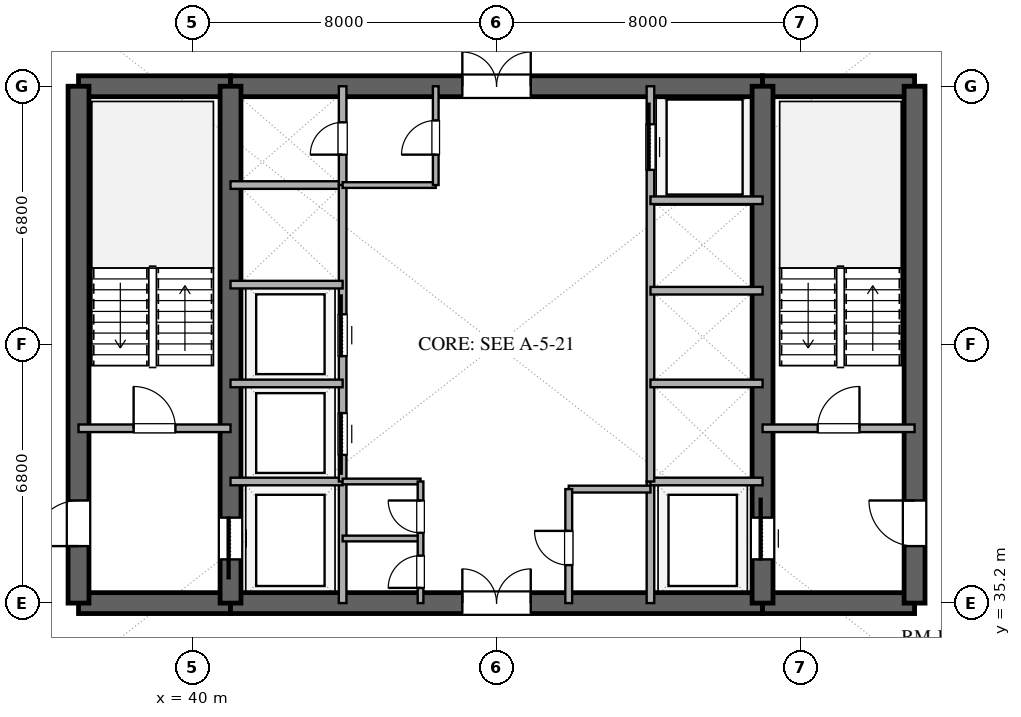
"""IFC4 building model, lengths in metres.
Left out: names, types, materials, properties, quantities, classifications, styles, units other than length and angle.
Written with IfcOpenShell. Run it as: python <this file> out.ifc"""

import sys

from ifc_helpers import new_model, si_unit, direction, frame, frame_2d, origin, place, context, subcontext, project, spatial, rectangle, extrude, element, fill, save


model = new_model("IFC4")
c1 = context("Model", 3, precision=1e-05, world=origin(), true_north=direction((0.0, 1.0)))
c2 = subcontext(c1, "Body", "Model", "MODEL_VIEW")
j1 = project(units=[si_unit("LENGTHUNIT", "METRE"), si_unit("PLANEANGLEUNIT", "RADIAN")], contexts=[c1])
p1 = place(None, origin())
s1 = spatial("IfcSite", under=j1, at=p1, CompositionType="ELEMENT")
p2 = place(p1, origin())
s2 = spatial("IfcBuilding", under=s1, at=p2, CompositionType="ELEMENT")
p3 = place(p2, frame((0.0, 0.0, 130.8)))
s3 = spatial("IfcBuildingStorey", under=s2, at=p3, CompositionType="ELEMENT", Elevation=130.8)
p4 = place(p3, frame((37.0, 35.2, 0.0), z_axis=(0.0, 0.0, 1.0), x_axis=(1.0, 0.0, 0.0)))
e1 = element("IfcWall", 1, at=p4, inside=s3, PredefinedType="SHEAR", context=c2, shape_type="SweptSolid", body=[
    extrude(rectangle(XDim=4.0, YDim=0.55, at=frame_2d((2.0, 0.0))), origin(), (0.0, 0.0, 1.0), 3.32),
])
p5 = place(p3, frame((41.0, 35.2, 0.0), z_axis=(0.0, 0.0, 1.0), x_axis=(1.0, 0.0, 0.0)))
e2 = element("IfcWall", 2, at=p5, inside=s3, PredefinedType="SHEAR", context=c2, shape_type="SweptSolid", body=[
    extrude(rectangle(XDim=14.0, YDim=0.55, at=frame_2d((7.0, 0.0))), origin(), (0.0, 0.0, 1.0), 3.32),
])
p6 = place(p5, frame((6.1, 0.0, 0.0)))
e3 = element("IfcOpeningElement", 3, at=p6, cuts=e2, PredefinedType="OPENING", context=c2, shape_type="SweptSolid", body=[
    extrude(rectangle(XDim=1.8, YDim=2.25, at=frame_2d((0.9, 1.125))), frame((0.0, 0.285, 0.0), z_axis=(0.0, -1.0, 0.0), x_axis=(1.0, 0.0, 0.0)), (0.0, 0.0, 1.0), 0.57),
])
for number, where, z_axis, x_axis in (
    (4, (55.0, 35.2, 0.0), (0.0, 0.0, 1.0), (1.0, 0.0, 0.0)),
    (5, (37.0, 48.8, 0.0), (0.0, 0.0, 1.0), (1.0, 0.0, 0.0)),
):
    element("IfcWall", number, at=place(p3, frame(where, z_axis=z_axis, x_axis=x_axis)), inside=s3, PredefinedType="SHEAR", context=c2, shape_type="SweptSolid", body=[
        extrude(rectangle(XDim=4.0, YDim=0.55, at=frame_2d((2.0, 0.0))), origin(), (0.0, 0.0, 1.0), 3.32),
    ])
p7 = place(p3, frame((41.0, 48.8, 0.0), z_axis=(0.0, 0.0, 1.0), x_axis=(1.0, 0.0, 0.0)))
e6 = element("IfcWall", 6, at=p7, inside=s3, PredefinedType="SHEAR", context=c2, shape_type="SweptSolid", body=[
    extrude(rectangle(XDim=14.0, YDim=0.55, at=frame_2d((7.0, 0.0))), origin(), (0.0, 0.0, 1.0), 3.32),
])
p8 = place(p7, frame((6.1, 0.0, 0.0)))
e7 = element("IfcOpeningElement", 7, at=p8, cuts=e6, PredefinedType="OPENING", context=c2, shape_type="SweptSolid", body=[
    extrude(rectangle(XDim=1.8, YDim=2.25, at=frame_2d((0.9, 1.125))), frame((0.0, 0.285, 0.0), z_axis=(0.0, -1.0, 0.0), x_axis=(1.0, 0.0, 0.0)), (0.0, 0.0, 1.0), 0.57),
])
p9 = place(p3, frame((55.0, 48.8, 0.0), z_axis=(0.0, 0.0, 1.0), x_axis=(1.0, 0.0, 0.0)))
e8 = element("IfcWall", 8, at=p9, inside=s3, PredefinedType="SHEAR", context=c2, shape_type="SweptSolid", body=[
    extrude(rectangle(XDim=4.0, YDim=0.55, at=frame_2d((2.0, 0.0))), origin(), (0.0, 0.0, 1.0), 3.32),
])
p10 = place(p3, frame((37.0, 35.2, 0.0), z_axis=(0.0, 0.0, 1.0), x_axis=(0.0, 1.0, 0.0)))
e9 = element("IfcWall", 9, at=p10, inside=s3, PredefinedType="SHEAR", context=c2, shape_type="SweptSolid", body=[
    extrude(rectangle(XDim=13.6, YDim=0.55, at=frame_2d((6.8, 0.0))), origin(), (0.0, 0.0, 1.0), 3.32),
])
p11 = place(p10, frame((1.5, 0.0, 0.0)))
e10 = element("IfcOpeningElement", 10, at=p11, cuts=e9, PredefinedType="OPENING", context=c2, shape_type="SweptSolid", body=[
    extrude(rectangle(XDim=1.2, YDim=2.15, at=frame_2d((0.6, 1.075))), frame((0.0, 0.285, 0.0), z_axis=(0.0, -1.0, 0.0), x_axis=(1.0, 0.0, 0.0)), (0.0, 0.0, 1.0), 0.57),
])
p12 = place(p3, frame((59.0, 35.2, 0.0), z_axis=(0.0, 0.0, 1.0), x_axis=(0.0, 1.0, 0.0)))
e11 = element("IfcWall", 11, at=p12, inside=s3, PredefinedType="SHEAR", context=c2, shape_type="SweptSolid", body=[
    extrude(rectangle(XDim=13.6, YDim=0.55, at=frame_2d((6.8, 0.0))), origin(), (0.0, 0.0, 1.0), 3.32),
])
p13 = place(p12, frame((1.5, 0.0, 0.0)))
e12 = element("IfcOpeningElement", 12, at=p13, cuts=e11, PredefinedType="OPENING", context=c2, shape_type="SweptSolid", body=[
    extrude(rectangle(XDim=1.2, YDim=2.15, at=frame_2d((0.6, 1.075))), frame((0.0, 0.285, 0.0), z_axis=(0.0, -1.0, 0.0), x_axis=(1.0, 0.0, 0.0)), (0.0, 0.0, 1.0), 0.57),
])
p14 = place(p3, frame((41.0, 35.2, 0.0), z_axis=(0.0, 0.0, 1.0), x_axis=(0.0, 1.0, 0.0)))
e13 = element("IfcWall", 13, at=p14, inside=s3, PredefinedType="SHEAR", context=c2, shape_type="SweptSolid", body=[
    extrude(rectangle(XDim=13.6, YDim=0.55, at=frame_2d((6.8, 0.0))), origin(), (0.0, 0.0, 1.0), 3.32),
])
p15 = place(p14, frame((1.15, 0.0, 0.0)))
e14 = element("IfcOpeningElement", 14, at=p15, cuts=e13, PredefinedType="OPENING", context=c2, shape_type="SweptSolid", body=[
    extrude(rectangle(XDim=1.1, YDim=2.2, at=frame_2d((0.55, 1.1))), frame((0.0, 0.285, 0.0), z_axis=(0.0, -1.0, 0.0), x_axis=(1.0, 0.0, 0.0)), (0.0, 0.0, 1.0), 0.57),
])
p16 = place(p3, frame((55.0, 35.2, 0.0), z_axis=(0.0, 0.0, 1.0), x_axis=(0.0, 1.0, 0.0)))
e15 = element("IfcWall", 15, at=p16, inside=s3, PredefinedType="SHEAR", context=c2, shape_type="SweptSolid", body=[
    extrude(rectangle(XDim=13.6, YDim=0.55, at=frame_2d((6.8, 0.0))), origin(), (0.0, 0.0, 1.0), 3.32),
])
p17 = place(p16, frame((1.15, 0.0, 0.0)))
e16 = element("IfcOpeningElement", 16, at=p17, cuts=e15, PredefinedType="OPENING", context=c2, shape_type="SweptSolid", body=[
    extrude(rectangle(XDim=1.1, YDim=2.2, at=frame_2d((0.55, 1.1))), frame((0.0, 0.285, 0.0), z_axis=(0.0, -1.0, 0.0), x_axis=(1.0, 0.0, 0.0)), (0.0, 0.0, 1.0), 0.57),
])
p18 = place(p3, frame((37.0, 39.8, 0.0), z_axis=(0.0, 0.0, 1.0), x_axis=(1.0, 0.0, 0.0)))
e17 = element("IfcWall", 17, at=p18, inside=s3, PredefinedType="SOLIDWALL", context=c2, shape_type="SweptSolid", body=[
    extrude(rectangle(XDim=4.0, YDim=0.2, at=frame_2d((2.0, 0.0))), origin(), (0.0, 0.0, 1.0), 2.68),
])
p19 = place(p18, frame((1.45, 0.0, 0.0)))
e18 = element("IfcOpeningElement", 18, at=p19, cuts=e17, PredefinedType="OPENING", context=c2, shape_type="SweptSolid", body=[
    extrude(rectangle(XDim=1.1, YDim=2.15, at=frame_2d((0.55, 1.075))), frame((0.0, 0.11, 0.0), z_axis=(0.0, -1.0, 0.0), x_axis=(1.0, 0.0, 0.0)), (0.0, 0.0, 1.0), 0.22),
])
p20 = place(p3, frame((55.0, 39.8, 0.0), z_axis=(0.0, 0.0, 1.0), x_axis=(1.0, 0.0, 0.0)))
e19 = element("IfcWall", 19, at=p20, inside=s3, PredefinedType="SOLIDWALL", context=c2, shape_type="SweptSolid", body=[
    extrude(rectangle(XDim=4.0, YDim=0.2, at=frame_2d((2.0, 0.0))), origin(), (0.0, 0.0, 1.0), 2.68),
])
p21 = place(p20, frame((1.45, 0.0, 0.0)))
e20 = element("IfcOpeningElement", 20, at=p21, cuts=e19, PredefinedType="OPENING", context=c2, shape_type="SweptSolid", body=[
    extrude(rectangle(XDim=1.1, YDim=2.15, at=frame_2d((0.55, 1.075))), frame((0.0, 0.11, 0.0), z_axis=(0.0, -1.0, 0.0), x_axis=(1.0, 0.0, 0.0)), (0.0, 0.0, 1.0), 0.22),
])
p22 = place(p3, frame((43.95, 35.2, 0.0), z_axis=(0.0, 0.0, 1.0), x_axis=(0.0, 1.0, 0.0)))
e21 = element("IfcWall", 21, at=p22, inside=s3, PredefinedType="SOLIDWALL", context=c2, shape_type="SweptSolid", body=[
    extrude(rectangle(XDim=3.2, YDim=0.2, at=frame_2d((1.6, 0.0))), origin(), (0.0, 0.0, 1.0), 2.68),
])
p23 = place(p3, frame((41.0, 38.4, 0.0), z_axis=(0.0, 0.0, 1.0), x_axis=(1.0, 0.0, 0.0)))
e22 = element("IfcWall", 22, at=p23, inside=s3, PredefinedType="SOLIDWALL", context=c2, shape_type="SweptSolid", body=[
    extrude(rectangle(XDim=2.95, YDim=0.2, at=frame_2d((1.475, 0.0))), origin(), (0.0, 0.0, 1.0), 2.68),
])
p24 = place(p3, frame((52.05, 35.2, 0.0), z_axis=(0.0, 0.0, 1.0), x_axis=(0.0, 1.0, 0.0)))
e23 = element("IfcWall", 23, at=p24, inside=s3, PredefinedType="SOLIDWALL", context=c2, shape_type="SweptSolid", body=[
    extrude(rectangle(XDim=3.2, YDim=0.2, at=frame_2d((1.6, 0.0))), origin(), (0.0, 0.0, 1.0), 2.68),
])
for number, where, z_axis, x_axis in (
    (24, (52.05, 38.4, 0.0), (0.0, 0.0, 1.0), (1.0, 0.0, 0.0)),
    (25, (41.0, 46.2, 0.0), (0.0, 0.0, 1.0), (1.0, 0.0, 0.0)),
):
    element("IfcWall", number, at=place(p3, frame(where, z_axis=z_axis, x_axis=x_axis)), inside=s3, PredefinedType="SOLIDWALL", context=c2, shape_type="SweptSolid", body=[
        extrude(rectangle(XDim=2.95, YDim=0.2, at=frame_2d((1.475, 0.0))), origin(), (0.0, 0.0, 1.0), 2.68),
    ])
p25 = place(p3, frame((43.95, 46.2, 0.0), z_axis=(0.0, 0.0, 1.0), x_axis=(0.0, 1.0, 0.0)))
e26 = element("IfcWall", 26, at=p25, inside=s3, PredefinedType="SOLIDWALL", context=c2, shape_type="SweptSolid", body=[
    extrude(rectangle(XDim=2.6, YDim=0.2, at=frame_2d((1.3, 0.0))), origin(), (0.0, 0.0, 1.0), 2.68),
])
p26 = place(p25, frame((0.8, 0.0, 0.0)))
e27 = element("IfcOpeningElement", 27, at=p26, cuts=e26, PredefinedType="OPENING", context=c2, shape_type="SweptSolid", body=[
    extrude(rectangle(XDim=0.85, YDim=2.15, at=frame_2d((0.425, 1.075))), frame((0.0, 0.11, 0.0), z_axis=(0.0, -1.0, 0.0), x_axis=(1.0, 0.0, 0.0)), (0.0, 0.0, 1.0), 0.22),
])
p27 = place(p3, frame((43.95, 38.4, 0.0), z_axis=(0.0, 0.0, 1.0), x_axis=(0.0, 1.0, 0.0)))
e28 = element("IfcWall", 28, at=p27, inside=s3, PredefinedType="SOLIDWALL", context=c2, shape_type="SweptSolid", body=[
    extrude(rectangle(XDim=7.8, YDim=0.2, at=frame_2d((3.9, 0.0))), origin(), (0.0, 0.0, 1.0), 2.68),
])
p28 = place(p27, frame((0.7, 0.0, 0.0)))
e29 = element("IfcOpeningElement", 29, at=p28, cuts=e28, PredefinedType="OPENING", context=c2, shape_type="SweptSolid", body=[
    extrude(rectangle(XDim=1.1, YDim=2.2, at=frame_2d((0.55, 1.1))), frame((0.0, 0.11, 0.0), z_axis=(0.0, -1.0, 0.0), x_axis=(1.0, 0.0, 0.0)), (0.0, 0.0, 1.0), 0.22),
])
p29 = place(p27, frame((3.3, 0.0, 0.0)))
e30 = element("IfcOpeningElement", 30, at=p29, cuts=e28, PredefinedType="OPENING", context=c2, shape_type="SweptSolid", body=[
    extrude(rectangle(XDim=1.1, YDim=2.2, at=frame_2d((0.55, 1.1))), frame((0.0, 0.11, 0.0), z_axis=(0.0, -1.0, 0.0), x_axis=(1.0, 0.0, 0.0)), (0.0, 0.0, 1.0), 0.22),
])
for number, where, z_axis, x_axis in (
    (31, (41.0, 40.98, 0.0), (0.0, 0.0, 1.0), (1.0, 0.0, 0.0)),
    (32, (41.0, 43.58, 0.0), (0.0, 0.0, 1.0), (1.0, 0.0, 0.0)),
):
    element("IfcWall", number, at=place(p3, frame(where, z_axis=z_axis, x_axis=x_axis)), inside=s3, PredefinedType="SOLIDWALL", context=c2, shape_type="SweptSolid", body=[
        extrude(rectangle(XDim=2.95, YDim=0.2, at=frame_2d((1.475, 0.0))), origin(), (0.0, 0.0, 1.0), 2.68),
    ])
p30 = place(p3, frame((52.05, 38.4, 0.0), z_axis=(0.0, 0.0, 1.0), x_axis=(0.0, 1.0, 0.0)))
e33 = element("IfcWall", 33, at=p30, inside=s3, PredefinedType="SOLIDWALL", context=c2, shape_type="SweptSolid", body=[
    extrude(rectangle(XDim=10.4, YDim=0.2, at=frame_2d((5.2, 0.0))), origin(), (0.0, 0.0, 1.0), 2.68),
])
p31 = place(p30, frame((8.2, 0.0, 0.0)))
e34 = element("IfcOpeningElement", 34, at=p31, cuts=e33, PredefinedType="OPENING", context=c2, shape_type="SweptSolid", body=[
    extrude(rectangle(XDim=1.2, YDim=2.2, at=frame_2d((0.6, 1.1))), frame((0.0, 0.11, 0.0), z_axis=(0.0, -1.0, 0.0), x_axis=(1.0, 0.0, 0.0)), (0.0, 0.0, 1.0), 0.22),
])
for number, where, z_axis, x_axis in (
    (35, (52.05, 40.98, 0.0), (0.0, 0.0, 1.0), (1.0, 0.0, 0.0)),
    (36, (52.05, 43.42, 0.0), (0.0, 0.0, 1.0), (1.0, 0.0, 0.0)),
    (37, (52.05, 45.8, 0.0), (0.0, 0.0, 1.0), (1.0, 0.0, 0.0)),
):
    element("IfcWall", number, at=place(p3, frame(where, z_axis=z_axis, x_axis=x_axis)), inside=s3, PredefinedType="SOLIDWALL", context=c2, shape_type="SweptSolid", body=[
        extrude(rectangle(XDim=2.95, YDim=0.2, at=frame_2d((1.475, 0.0))), origin(), (0.0, 0.0, 1.0), 2.68),
    ])
for number, where, z_axis, x_axis in (
    (38, (43.95, 36.9, 0.0), (0.0, 0.0, 1.0), (1.0, 0.0, 0.0)),
    (39, (43.95, 38.4, 0.0), (0.0, 0.0, 1.0), (1.0, 0.0, 0.0)),
):
    element("IfcWall", number, at=place(p3, frame(where, z_axis=z_axis, x_axis=x_axis)), inside=s3, PredefinedType="PARTITIONING", context=c2, shape_type="SweptSolid", body=[
        extrude(rectangle(XDim=2.05, YDim=0.15, at=frame_2d((1.025, 0.0))), origin(), (0.0, 0.0, 1.0), 2.68),
    ])
p32 = place(p3, frame((46.0, 35.2, 0.0), z_axis=(0.0, 0.0, 1.0), x_axis=(0.0, 1.0, 0.0)))
e40 = element("IfcWall", 40, at=p32, inside=s3, PredefinedType="PARTITIONING", context=c2, shape_type="SweptSolid", body=[
    extrude(rectangle(XDim=3.2, YDim=0.15, at=frame_2d((1.6, 0.0))), origin(), (0.0, 0.0, 1.0), 2.68),
])
p33 = place(p32, frame((0.4, 0.0, 0.0)))
e41 = element("IfcOpeningElement", 41, at=p33, cuts=e40, PredefinedType="OPENING", context=c2, shape_type="SweptSolid", body=[
    extrude(rectangle(XDim=0.85, YDim=2.15, at=frame_2d((0.425, 1.075))), frame((0.0, 0.085, 0.0), z_axis=(0.0, -1.0, 0.0), x_axis=(1.0, 0.0, 0.0)), (0.0, 0.0, 1.0), 0.17),
])
p34 = place(p32, frame((1.85, 0.0, 0.0)))
e42 = element("IfcOpeningElement", 42, at=p34, cuts=e40, PredefinedType="OPENING", context=c2, shape_type="SweptSolid", body=[
    extrude(rectangle(XDim=0.85, YDim=2.15, at=frame_2d((0.425, 1.075))), frame((0.0, 0.085, 0.0), z_axis=(0.0, -1.0, 0.0), x_axis=(1.0, 0.0, 0.0)), (0.0, 0.0, 1.0), 0.17),
])
p35 = place(p3, frame((43.95, 46.2, 0.0), z_axis=(0.0, 0.0, 1.0), x_axis=(1.0, 0.0, 0.0)))
e43 = element("IfcWall", 43, at=p35, inside=s3, PredefinedType="PARTITIONING", context=c2, shape_type="SweptSolid", body=[
    extrude(rectangle(XDim=2.45, YDim=0.15, at=frame_2d((1.225, 0.0))), origin(), (0.0, 0.0, 1.0), 2.68),
])
p36 = place(p3, frame((46.4, 46.2, 0.0), z_axis=(0.0, 0.0, 1.0), x_axis=(0.0, 1.0, 0.0)))
e44 = element("IfcWall", 44, at=p36, inside=s3, PredefinedType="PARTITIONING", context=c2, shape_type="SweptSolid", body=[
    extrude(rectangle(XDim=2.6, YDim=0.15, at=frame_2d((1.3, 0.0))), origin(), (0.0, 0.0, 1.0), 2.68),
])
p37 = place(p36, frame((0.8, 0.0, 0.0)))
e45 = element("IfcOpeningElement", 45, at=p37, cuts=e44, PredefinedType="OPENING", context=c2, shape_type="SweptSolid", body=[
    extrude(rectangle(XDim=0.9, YDim=2.15, at=frame_2d((0.45, 1.075))), frame((0.0, 0.085, 0.0), z_axis=(0.0, -1.0, 0.0), x_axis=(1.0, 0.0, 0.0)), (0.0, 0.0, 1.0), 0.17),
])
p38 = place(p3, frame((49.9, 38.2, 0.0), z_axis=(0.0, 0.0, 1.0), x_axis=(1.0, 0.0, 0.0)))
e46 = element("IfcWall", 46, at=p38, inside=s3, PredefinedType="PLUMBINGWALL", context=c2, shape_type="SweptSolid", body=[
    extrude(rectangle(XDim=2.15, YDim=0.18, at=frame_2d((1.075, 0.0))), origin(), (0.0, 0.0, 1.0), 2.68),
])
p39 = place(p3, frame((49.9, 35.2, 0.0), z_axis=(0.0, 0.0, 1.0), x_axis=(0.0, 1.0, 0.0)))
e47 = element("IfcWall", 47, at=p39, inside=s3, PredefinedType="PLUMBINGWALL", context=c2, shape_type="SweptSolid", body=[
    extrude(rectangle(XDim=3.0, YDim=0.18, at=frame_2d((1.5, 0.0))), origin(), (0.0, 0.0, 1.0), 2.68),
])
p40 = place(p39, frame((1.0, 0.0, 0.0)))
e48 = element("IfcOpeningElement", 48, at=p40, cuts=e47, PredefinedType="OPENING", context=c2, shape_type="SweptSolid", body=[
    extrude(rectangle(XDim=0.9, YDim=2.1, at=frame_2d((0.45, 1.05))), frame((0.0, 0.1, 0.0), z_axis=(0.0, -1.0, 0.0), x_axis=(1.0, 0.0, 0.0)), (0.0, 0.0, 1.0), 0.2),
])
p41 = place(p15, origin())
e49 = element("IfcDoor", 49, at=p41, inside=s3, OperationType="SLIDING_TO_LEFT", PredefinedType="DOOR", context=c2, shape_type="SweptSolid", body=[
    extrude(rectangle(XDim=1.1, YDim=2.2, at=frame_2d((0.55, 1.1))), frame((0.0, 0.025, 0.0), z_axis=(0.0, -1.0, 0.0), x_axis=(1.0, 0.0, 0.0)), (0.0, 0.0, 1.0), 0.05),
])
fill(e14, e49)
p42 = place(p17, origin())
e50 = element("IfcDoor", 50, at=p42, inside=s3, OperationType="SLIDING_TO_RIGHT", PredefinedType="DOOR", context=c2, shape_type="SweptSolid", body=[
    extrude(rectangle(XDim=1.1, YDim=2.2, at=frame_2d((0.55, 1.1))), frame((0.0, 0.025, 0.0), z_axis=(0.0, -1.0, 0.0), x_axis=(1.0, 0.0, 0.0)), (0.0, 0.0, 1.0), 0.05),
])
fill(e16, e50)
p43 = place(p11, origin())
e51 = element("IfcDoor", 51, at=p43, inside=s3, OperationType="SINGLE_SWING_LEFT", PredefinedType="DOOR", context=c2, shape_type="SweptSolid", body=[
    extrude(rectangle(XDim=1.2, YDim=2.15, at=frame_2d((0.6, 1.075))), frame((0.0, 0.025, 0.0), z_axis=(0.0, -1.0, 0.0), x_axis=(1.0, 0.0, 0.0)), (0.0, 0.0, 1.0), 0.05),
])
fill(e10, e51)
p44 = place(p13, origin())
e52 = element("IfcDoor", 52, at=p44, inside=s3, OperationType="SINGLE_SWING_RIGHT", PredefinedType="DOOR", context=c2, shape_type="SweptSolid", body=[
    extrude(rectangle(XDim=1.2, YDim=2.15, at=frame_2d((0.6, 1.075))), frame((0.0, 0.025, 0.0), z_axis=(0.0, -1.0, 0.0), x_axis=(1.0, 0.0, 0.0)), (0.0, 0.0, 1.0), 0.05),
])
fill(e12, e52)
p45 = place(p6, origin())
e53 = element("IfcDoor", 53, at=p45, inside=s3, OperationType="DOUBLE_DOOR_SINGLE_SWING", PredefinedType="DOOR", context=c2, shape_type="SweptSolid", body=[
    extrude(rectangle(XDim=1.8, YDim=2.25, at=frame_2d((0.9, 1.125))), frame((0.0, 0.025, 0.0), z_axis=(0.0, -1.0, 0.0), x_axis=(1.0, 0.0, 0.0)), (0.0, 0.0, 1.0), 0.05),
])
fill(e3, e53)
p46 = place(p8, origin())
e54 = element("IfcDoor", 54, at=p46, inside=s3, OperationType="DOUBLE_DOOR_SINGLE_SWING", PredefinedType="DOOR", context=c2, shape_type="SweptSolid", body=[
    extrude(rectangle(XDim=1.8, YDim=2.25, at=frame_2d((0.9, 1.125))), frame((0.0, 0.025, 0.0), z_axis=(0.0, -1.0, 0.0), x_axis=(1.0, 0.0, 0.0)), (0.0, 0.0, 1.0), 0.05),
])
fill(e7, e54)
p47 = place(p19, origin())
e55 = element("IfcDoor", 55, at=p47, inside=s3, OperationType="SINGLE_SWING_LEFT", PredefinedType="DOOR", context=c2, shape_type="SweptSolid", body=[
    extrude(rectangle(XDim=1.1, YDim=2.15, at=frame_2d((0.55, 1.075))), frame((0.0, 0.025, 0.0), z_axis=(0.0, -1.0, 0.0), x_axis=(1.0, 0.0, 0.0)), (0.0, 0.0, 1.0), 0.05),
])
fill(e18, e55)
p48 = place(p21, origin())
e56 = element("IfcDoor", 56, at=p48, inside=s3, OperationType="SINGLE_SWING_RIGHT", PredefinedType="DOOR", context=c2, shape_type="SweptSolid", body=[
    extrude(rectangle(XDim=1.1, YDim=2.15, at=frame_2d((0.55, 1.075))), frame((0.0, 0.025, 0.0), z_axis=(0.0, -1.0, 0.0), x_axis=(1.0, 0.0, 0.0)), (0.0, 0.0, 1.0), 0.05),
])
fill(e20, e56)
p49 = place(p26, origin())
e57 = element("IfcDoor", 57, at=p49, inside=s3, OperationType="SINGLE_SWING_LEFT", PredefinedType="DOOR", context=c2, shape_type="SweptSolid", body=[
    extrude(rectangle(XDim=0.85, YDim=2.15, at=frame_2d((0.425, 1.075))), frame((0.0, 0.025, 0.0), z_axis=(0.0, -1.0, 0.0), x_axis=(1.0, 0.0, 0.0)), (0.0, 0.0, 1.0), 0.05),
])
fill(e27, e57)
p50 = place(p28, origin())
e58 = element("IfcDoor", 58, at=p50, inside=s3, OperationType="SLIDING_TO_LEFT", PredefinedType="DOOR", context=c2, shape_type="SweptSolid", body=[
    extrude(rectangle(XDim=1.1, YDim=2.2, at=frame_2d((0.55, 1.1))), frame((0.0, 0.025, 0.0), z_axis=(0.0, -1.0, 0.0), x_axis=(1.0, 0.0, 0.0)), (0.0, 0.0, 1.0), 0.05),
])
fill(e29, e58)
p51 = place(p29, origin())
e59 = element("IfcDoor", 59, at=p51, inside=s3, OperationType="SLIDING_TO_RIGHT", PredefinedType="DOOR", context=c2, shape_type="SweptSolid", body=[
    extrude(rectangle(XDim=1.1, YDim=2.2, at=frame_2d((0.55, 1.1))), frame((0.0, 0.025, 0.0), z_axis=(0.0, -1.0, 0.0), x_axis=(1.0, 0.0, 0.0)), (0.0, 0.0, 1.0), 0.05),
])
fill(e30, e59)
p52 = place(p31, origin())
e60 = element("IfcDoor", 60, at=p52, inside=s3, OperationType="SLIDING_TO_RIGHT", PredefinedType="DOOR", context=c2, shape_type="SweptSolid", body=[
    extrude(rectangle(XDim=1.2, YDim=2.2, at=frame_2d((0.6, 1.1))), frame((0.0, 0.025, 0.0), z_axis=(0.0, -1.0, 0.0), x_axis=(1.0, 0.0, 0.0)), (0.0, 0.0, 1.0), 0.05),
])
fill(e34, e60)
p53 = place(p33, origin())
e61 = element("IfcDoor", 61, at=p53, inside=s3, OperationType="SINGLE_SWING_LEFT", PredefinedType="DOOR", context=c2, shape_type="SweptSolid", body=[
    extrude(rectangle(XDim=0.85, YDim=2.15, at=frame_2d((0.425, 1.075))), frame((0.0, 0.025, 0.0), z_axis=(0.0, -1.0, 0.0), x_axis=(1.0, 0.0, 0.0)), (0.0, 0.0, 1.0), 0.05),
])
fill(e41, e61)
p54 = place(p34, origin())
e62 = element("IfcDoor", 62, at=p54, inside=s3, OperationType="SINGLE_SWING_RIGHT", PredefinedType="DOOR", context=c2, shape_type="SweptSolid", body=[
    extrude(rectangle(XDim=0.85, YDim=2.15, at=frame_2d((0.425, 1.075))), frame((0.0, 0.025, 0.0), z_axis=(0.0, -1.0, 0.0), x_axis=(1.0, 0.0, 0.0)), (0.0, 0.0, 1.0), 0.05),
])
fill(e42, e62)
p55 = place(p37, origin())
e63 = element("IfcDoor", 63, at=p55, inside=s3, OperationType="SINGLE_SWING_LEFT", PredefinedType="DOOR", context=c2, shape_type="SweptSolid", body=[
    extrude(rectangle(XDim=0.9, YDim=2.15, at=frame_2d((0.45, 1.075))), frame((0.0, 0.025, 0.0), z_axis=(0.0, -1.0, 0.0), x_axis=(1.0, 0.0, 0.0)), (0.0, 0.0, 1.0), 0.05),
])
fill(e45, e63)
p56 = place(p40, origin())
e64 = element("IfcDoor", 64, at=p56, inside=s3, OperationType="SINGLE_SWING_RIGHT", PredefinedType="DOOR", context=c2, shape_type="SweptSolid", body=[
    extrude(rectangle(XDim=0.9, YDim=2.1, at=frame_2d((0.45, 1.05))), frame((0.0, 0.025, 0.0), z_axis=(0.0, -1.0, 0.0), x_axis=(1.0, 0.0, 0.0)), (0.0, 0.0, 1.0), 0.05),
])
fill(e48, e64)
save(model, sys.argv[1])
